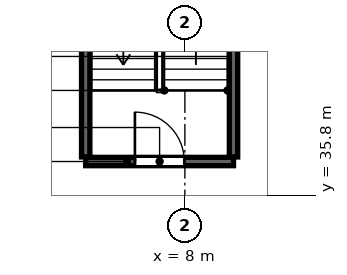
"""IFC4 building model, lengths in metres.
Left out: names, types, materials, properties, quantities, classifications, styles, units other than length and angle.
Written with IfcOpenShell. Run it as: python <this file> out.ifc"""

import sys

from ifc_helpers import new_model, si_unit, direction, frame, frame_2d, origin, place, context, subcontext, project, spatial, rectangle, extrude, source, transform, mapped, element, fill, save


model = new_model("IFC4")
c1 = context("Model", 3, precision=1e-05, world=origin(), true_north=direction((0.0, 1.0)))
c2 = subcontext(c1, "Body", "Model", "MODEL_VIEW")
j1 = project(units=[si_unit("LENGTHUNIT", "METRE"), si_unit("PLANEANGLEUNIT", "RADIAN")], contexts=[c1])
p1 = place(None, origin())
s1 = spatial("IfcSite", under=j1, at=p1, CompositionType="ELEMENT")
p2 = place(p1, origin())
s2 = spatial("IfcBuilding", under=s1, at=p2, CompositionType="ELEMENT")
p3 = place(p2, frame((0.0, 0.0, 12.0)))
s3 = spatial("IfcBuildingStorey", under=s2, at=p3, CompositionType="ELEMENT", Elevation=12.0)
m1 = source(origin(), c2, "Body", "SweptSolid", [
    extrude(rectangle(XDim=3.89, YDim=0.22, at=frame_2d((1.945, 0.0))), origin(), (0.0, 0.0, 1.0), 6.0),
])
p4 = place(p3, frame((5.39, 36.69, 0.0), z_axis=(0.0, 0.0, 1.0), x_axis=(1.0, 0.0, 0.0)))
e1 = element("IfcWall", 1, at=p4, inside=s3, PredefinedType="SOLIDWALL", context=c2, shape_type="MappedRepresentation", body=[
    mapped(m1, transform((0.0, 0.0, 0.0), scale=1.0)),
])
p5 = place(p4, frame((1.295, 0.0, 0.0)))
e2 = element("IfcOpeningElement", 2, at=p5, cuts=e1, PredefinedType="OPENING", context=c2, shape_type="SweptSolid", body=[
    extrude(rectangle(XDim=1.3, YDim=2.15, at=frame_2d((0.65, 1.075))), frame((0.0, 0.12, 0.0), z_axis=(0.0, -1.0, 0.0), x_axis=(1.0, 0.0, 0.0)), (0.0, 0.0, 1.0), 0.24),
])
m2 = source(origin(), c2, "Body", "SweptSolid", [
    extrude(rectangle(XDim=10.38, YDim=0.22, at=frame_2d((5.19, 0.0))), origin(), (0.0, 0.0, 1.0), 6.0),
])
for number, where, z_axis, x_axis in (
    (3, (5.39, 36.81, 0.0), (0.0, 0.0, 1.0), (0.0, 1.0, 0.0)),
    (4, (9.28, 36.81, 0.0), (0.0, 0.0, 1.0), (0.0, 1.0, 0.0)),
):
    element("IfcWall", number, at=place(p3, frame(where, z_axis=z_axis, x_axis=x_axis)), inside=s3, PredefinedType="SOLIDWALL", context=c2, shape_type="MappedRepresentation", body=[
        mapped(m2, transform((0.0, 0.0, 0.0), scale=1.0)),
    ])
m3 = source(origin(), c2, "Body", "SweptSolid", [
    extrude(rectangle(XDim=1.3, YDim=2.15, at=frame_2d((0.65, 1.075))), frame((0.0, 0.025, 0.0), z_axis=(0.0, -1.0, 0.0), x_axis=(1.0, 0.0, 0.0)), (0.0, 0.0, 1.0), 0.05),
])
p6 = place(p5, origin())
e5 = element("IfcDoor", 5, at=p6, inside=s3, OperationType="SINGLE_SWING_LEFT", PredefinedType="DOOR", context=c2, shape_type="MappedRepresentation", body=[
    mapped(m3, transform((0.0, 0.0, 0.0), scale=1.0)),
])
fill(e2, e5)
save(model, sys.argv[1])
